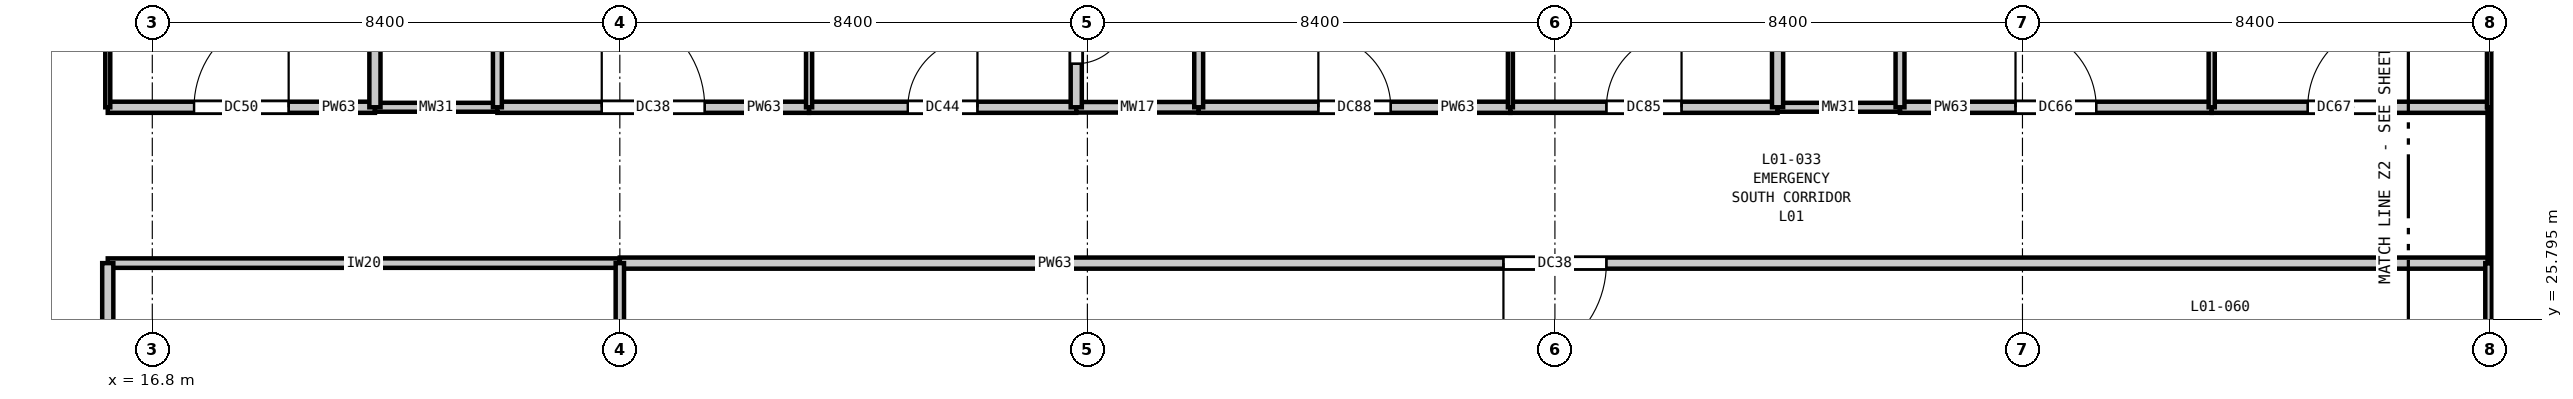
"""IFC4 building model, lengths in metres.
Left out: names, types, materials, properties, quantities, classifications, styles, units other than length and angle.
Written with IfcOpenShell. Run it as: python <this file> out.ifc"""

import sys

from ifc_helpers import new_model, si_unit, direction, frame, frame_2d, origin, place, context, subcontext, project, spatial, rectangle, extrude, element, fill, save


model = new_model("IFC4")
c1 = context("Model", 3, precision=1e-05, world=origin(), true_north=direction((0.0, 1.0)))
c2 = subcontext(c1, "Body", "Model", "MODEL_VIEW")
j1 = project(units=[si_unit("LENGTHUNIT", "METRE"), si_unit("PLANEANGLEUNIT", "RADIAN")], contexts=[c1])
p1 = place(None, origin())
s1 = spatial("IfcSite", under=j1, at=p1, CompositionType="ELEMENT")
p2 = place(p1, origin())
s2 = spatial("IfcBuilding", under=s1, at=p2, CompositionType="ELEMENT")
p3 = place(p2, frame((0.0, 0.0, 5.4)))
s3 = spatial("IfcBuildingStorey", under=s2, at=p3, CompositionType="ELEMENT", Elevation=5.4)
p4 = place(p3, frame((16.0, 26.8, 0.0), z_axis=(0.0, 0.0, 1.0), x_axis=(1.0, 0.0, 0.0)))
e1 = element("IfcWall", 1, at=p4, inside=s3, PredefinedType="PARTITIONING", context=c2, shape_type="SweptSolid", body=[
    extrude(rectangle(XDim=9.2, YDim=0.17, at=frame_2d((4.6, 0.0))), origin(), (0.0, 0.0, 1.0), 5.05),
])
p5 = place(p3, frame((25.2, 26.8, 0.0), z_axis=(0.0, 0.0, 1.0), x_axis=(1.0, 0.0, 0.0)))
e2 = element("IfcWall", 2, at=p5, inside=s3, PredefinedType="PARTITIONING", context=c2, shape_type="SweptSolid", body=[
    extrude(rectangle(XDim=33.6, YDim=0.2, at=frame_2d((16.8, 0.0))), origin(), (0.0, 0.0, 1.0), 5.05),
])
p6 = place(p5, frame((15.875, 0.0, 0.0)))
e3 = element("IfcOpeningElement", 3, at=p6, cuts=e2, PredefinedType="OPENING", context=c2, shape_type="SweptSolid", body=[
    extrude(rectangle(XDim=1.85, YDim=2.3, at=frame_2d((0.925, 1.15))), frame((0.0, 0.11, 0.0), z_axis=(0.0, -1.0, 0.0), x_axis=(1.0, 0.0, 0.0)), (0.0, 0.0, 1.0), 0.22),
])
p7 = place(p3, frame((16.0, 29.6, 0.0), z_axis=(0.0, 0.0, 1.0), x_axis=(1.0, 0.0, 0.0)))
e4 = element("IfcWall", 4, at=p7, inside=s3, PredefinedType="PARTITIONING", context=c2, shape_type="SweptSolid", body=[
    extrude(rectangle(XDim=4.8, YDim=0.2, at=frame_2d((2.4, 0.0))), origin(), (0.0, 0.0, 1.0), 5.05),
])
p8 = place(p7, frame((1.55, 0.0, 0.0)))
e5 = element("IfcOpeningElement", 5, at=p8, cuts=e4, PredefinedType="OPENING", context=c2, shape_type="SweptSolid", body=[
    extrude(rectangle(XDim=1.7, YDim=2.3, at=frame_2d((0.85, 1.15))), frame((0.0, 0.11, 0.0), z_axis=(0.0, -1.0, 0.0), x_axis=(1.0, 0.0, 0.0)), (0.0, 0.0, 1.0), 0.22),
])
p9 = place(p3, frame((20.8, 29.6, 0.0), z_axis=(0.0, 0.0, 1.0), x_axis=(1.0, 0.0, 0.0)))
e6 = element("IfcWall", 6, at=p9, inside=s3, PredefinedType="PLUMBINGWALL", context=c2, shape_type="SweptSolid", body=[
    extrude(rectangle(XDim=2.2, YDim=0.16, at=frame_2d((1.1, 0.0))), origin(), (0.0, 0.0, 1.0), 5.05),
])
p10 = place(p3, frame((23.0, 29.6, 0.0), z_axis=(0.0, 0.0, 1.0), x_axis=(1.0, 0.0, 0.0)))
e7 = element("IfcWall", 7, at=p10, inside=s3, PredefinedType="PARTITIONING", context=c2, shape_type="SweptSolid", body=[
    extrude(rectangle(XDim=5.6, YDim=0.2, at=frame_2d((2.8, 0.0))), origin(), (0.0, 0.0, 1.0), 5.05),
])
p11 = place(p10, frame((1.875, 0.0, 0.0)))
e8 = element("IfcOpeningElement", 8, at=p11, cuts=e7, PredefinedType="OPENING", context=c2, shape_type="SweptSolid", body=[
    extrude(rectangle(XDim=1.85, YDim=2.3, at=frame_2d((0.925, 1.15))), frame((0.0, 0.11, 0.0), z_axis=(0.0, -1.0, 0.0), x_axis=(1.0, 0.0, 0.0)), (0.0, 0.0, 1.0), 0.22),
])
p12 = place(p3, frame((28.6, 29.6, 0.0), z_axis=(0.0, 0.0, 1.0), x_axis=(1.0, 0.0, 0.0)))
e9 = element("IfcWall", 9, at=p12, inside=s3, PredefinedType="PARTITIONING", context=c2, shape_type="SweptSolid", body=[
    extrude(rectangle(XDim=4.8, YDim=0.2, at=frame_2d((2.4, 0.0))), origin(), (0.0, 0.0, 1.0), 5.05),
])
p13 = place(p12, frame((1.775, 0.0, 0.0)))
e10 = element("IfcOpeningElement", 10, at=p13, cuts=e9, PredefinedType="OPENING", context=c2, shape_type="SweptSolid", body=[
    extrude(rectangle(XDim=1.25, YDim=2.15, at=frame_2d((0.625, 1.075))), frame((0.0, 0.11, 0.0), z_axis=(0.0, -1.0, 0.0), x_axis=(1.0, 0.0, 0.0)), (0.0, 0.0, 1.0), 0.22),
])
p14 = place(p3, frame((33.4, 29.6, 0.0), z_axis=(0.0, 0.0, 1.0), x_axis=(1.0, 0.0, 0.0)))
e11 = element("IfcWall", 11, at=p14, inside=s3, PredefinedType="PLUMBINGWALL", context=c2, shape_type="SweptSolid", body=[
    extrude(rectangle(XDim=2.2, YDim=0.19, at=frame_2d((1.1, 0.0))), origin(), (0.0, 0.0, 1.0), 5.05),
])
p15 = place(p3, frame((35.6, 29.6, 0.0), z_axis=(0.0, 0.0, 1.0), x_axis=(1.0, 0.0, 0.0)))
e12 = element("IfcWall", 12, at=p15, inside=s3, PredefinedType="PARTITIONING", context=c2, shape_type="SweptSolid", body=[
    extrude(rectangle(XDim=5.6, YDim=0.2, at=frame_2d((2.8, 0.0))), origin(), (0.0, 0.0, 1.0), 5.05),
])
p16 = place(p15, frame((2.15, 0.0, 0.0)))
e13 = element("IfcOpeningElement", 13, at=p16, cuts=e12, PredefinedType="OPENING", context=c2, shape_type="SweptSolid", body=[
    extrude(rectangle(XDim=1.3, YDim=2.2, at=frame_2d((0.65, 1.1))), frame((0.0, 0.11, 0.0), z_axis=(0.0, -1.0, 0.0), x_axis=(1.0, 0.0, 0.0)), (0.0, 0.0, 1.0), 0.22),
])
p17 = place(p3, frame((41.2, 29.6, 0.0), z_axis=(0.0, 0.0, 1.0), x_axis=(1.0, 0.0, 0.0)))
e14 = element("IfcWall", 14, at=p17, inside=s3, PredefinedType="PARTITIONING", context=c2, shape_type="SweptSolid", body=[
    extrude(rectangle(XDim=4.8, YDim=0.2, at=frame_2d((2.4, 0.0))), origin(), (0.0, 0.0, 1.0), 5.05),
])
p18 = place(p17, frame((1.725, 0.0, 0.0)))
e15 = element("IfcOpeningElement", 15, at=p18, cuts=e14, PredefinedType="OPENING", context=c2, shape_type="SweptSolid", body=[
    extrude(rectangle(XDim=1.35, YDim=2.2, at=frame_2d((0.675, 1.1))), frame((0.0, 0.11, 0.0), z_axis=(0.0, -1.0, 0.0), x_axis=(1.0, 0.0, 0.0)), (0.0, 0.0, 1.0), 0.22),
])
p19 = place(p3, frame((46.0, 29.6, 0.0), z_axis=(0.0, 0.0, 1.0), x_axis=(1.0, 0.0, 0.0)))
e16 = element("IfcWall", 16, at=p19, inside=s3, PredefinedType="PLUMBINGWALL", context=c2, shape_type="SweptSolid", body=[
    extrude(rectangle(XDim=2.2, YDim=0.16, at=frame_2d((1.1, 0.0))), origin(), (0.0, 0.0, 1.0), 5.05),
])
p20 = place(p3, frame((48.2, 29.6, 0.0), z_axis=(0.0, 0.0, 1.0), x_axis=(1.0, 0.0, 0.0)))
e17 = element("IfcWall", 17, at=p20, inside=s3, PredefinedType="PARTITIONING", context=c2, shape_type="SweptSolid", body=[
    extrude(rectangle(XDim=5.6, YDim=0.2, at=frame_2d((2.8, 0.0))), origin(), (0.0, 0.0, 1.0), 5.05),
])
p21 = place(p20, frame((2.075, 0.0, 0.0)))
e18 = element("IfcOpeningElement", 18, at=p21, cuts=e17, PredefinedType="OPENING", context=c2, shape_type="SweptSolid", body=[
    extrude(rectangle(XDim=1.45, YDim=2.25, at=frame_2d((0.725, 1.125))), frame((0.0, 0.11, 0.0), z_axis=(0.0, -1.0, 0.0), x_axis=(1.0, 0.0, 0.0)), (0.0, 0.0, 1.0), 0.22),
])
p22 = place(p3, frame((53.8, 29.6, 0.0), z_axis=(0.0, 0.0, 1.0), x_axis=(1.0, 0.0, 0.0)))
e19 = element("IfcWall", 19, at=p22, inside=s3, PredefinedType="PARTITIONING", context=c2, shape_type="SweptSolid", body=[
    extrude(rectangle(XDim=5.0, YDim=0.2, at=frame_2d((2.5, 0.0))), origin(), (0.0, 0.0, 1.0), 5.05),
])
p23 = place(p22, frame((1.725, 0.0, 0.0)))
e20 = element("IfcOpeningElement", 20, at=p23, cuts=e19, PredefinedType="OPENING", context=c2, shape_type="SweptSolid", body=[
    extrude(rectangle(XDim=1.55, YDim=2.25, at=frame_2d((0.775, 1.125))), frame((0.0, 0.11, 0.0), z_axis=(0.0, -1.0, 0.0), x_axis=(1.0, 0.0, 0.0)), (0.0, 0.0, 1.0), 0.22),
])
p24 = place(p3, frame((16.0, 0.26, 0.0), z_axis=(0.0, 0.0, 1.0), x_axis=(0.0, 1.0, 0.0)))
e21 = element("IfcWall", 21, at=p24, inside=s3, PredefinedType="PARTITIONING", context=c2, shape_type="SweptSolid", body=[
    extrude(rectangle(XDim=26.54, YDim=0.2, at=frame_2d((13.27, 0.0))), origin(), (0.0, 0.0, 1.0), 5.05),
])
p25 = place(p24, frame((12.545, 0.0, 0.0)))
e22 = element("IfcOpeningElement", 22, at=p25, cuts=e21, PredefinedType="OPENING", context=c2, shape_type="SweptSolid", body=[
    extrude(rectangle(XDim=1.45, YDim=2.25, at=frame_2d((0.725, 1.125))), frame((0.0, 0.11, 0.0), z_axis=(0.0, -1.0, 0.0), x_axis=(1.0, 0.0, 0.0)), (0.0, 0.0, 1.0), 0.22),
])
p26 = place(p3, frame((16.0, 29.6, 0.0), z_axis=(0.0, 0.0, 1.0), x_axis=(0.0, 1.0, 0.0)))
e23 = element("IfcWall", 23, at=p26, inside=s3, PredefinedType="PARTITIONING", context=c2, shape_type="SweptSolid", body=[
    extrude(rectangle(XDim=11.2, YDim=0.09, at=frame_2d((5.6, 0.0))), origin(), (0.0, 0.0, 1.0), 5.05),
])
p27 = place(p3, frame((20.8, 29.6, 0.0), z_axis=(0.0, 0.0, 1.0), x_axis=(0.0, 1.0, 0.0)))
e24 = element("IfcWall", 24, at=p27, inside=s3, PredefinedType="PARTITIONING", context=c2, shape_type="SweptSolid", body=[
    extrude(rectangle(XDim=5.6, YDim=0.2, at=frame_2d((2.8, 0.0))), origin(), (0.0, 0.0, 1.0), 5.05),
])
p28 = place(p27, frame((2.34, 0.0, 0.0)))
e25 = element("IfcOpeningElement", 25, at=p28, cuts=e24, PredefinedType="OPENING", context=c2, shape_type="SweptSolid", body=[
    extrude(rectangle(XDim=0.92, YDim=2.1, at=frame_2d((0.46, 1.05))), frame((0.0, 0.11, 0.0), z_axis=(0.0, -1.0, 0.0), x_axis=(1.0, 0.0, 0.0)), (0.0, 0.0, 1.0), 0.22),
])
p29 = place(p3, frame((23.0, 29.6, 0.0), z_axis=(0.0, 0.0, 1.0), x_axis=(0.0, 1.0, 0.0)))
e26 = element("IfcWall", 26, at=p29, inside=s3, PredefinedType="PLUMBINGWALL", context=c2, shape_type="SweptSolid", body=[
    extrude(rectangle(XDim=5.6, YDim=0.16, at=frame_2d((2.8, 0.0))), origin(), (0.0, 0.0, 1.0), 5.05),
])
p30 = place(p3, frame((25.2, 24.315, 0.0), z_axis=(0.0, 0.0, 1.0), x_axis=(0.0, 1.0, 0.0)))
e27 = element("IfcWall", 27, at=p30, inside=s3, PredefinedType="PARTITIONING", context=c2, shape_type="SweptSolid", body=[
    extrude(rectangle(XDim=2.485, YDim=0.15, at=frame_2d((1.243, 0.0))), origin(), (0.0, 0.0, 1.0), 4.735),
])
p31 = place(p3, frame((28.6, 29.6, 0.0), z_axis=(0.0, 0.0, 1.0), x_axis=(0.0, 1.0, 0.0)))
e28 = element("IfcWall", 28, at=p31, inside=s3, PredefinedType="PARTITIONING", context=c2, shape_type="SweptSolid", body=[
    extrude(rectangle(XDim=10.94, YDim=0.11, at=frame_2d((5.47, 0.0))), origin(), (0.0, 0.0, 1.0), 5.05),
])
p32 = place(p3, frame((33.4, 29.6, 0.0), z_axis=(0.0, 0.0, 1.0), x_axis=(0.0, 1.0, 0.0)))
e29 = element("IfcWall", 29, at=p32, inside=s3, PredefinedType="PARTITIONING", context=c2, shape_type="SweptSolid", body=[
    extrude(rectangle(XDim=2.485, YDim=0.2, at=frame_2d((1.242, 0.0))), origin(), (0.0, 0.0, 1.0), 4.735),
])
p33 = place(p32, frame((0.782, 0.0, 0.0)))
e30 = element("IfcOpeningElement", 30, at=p33, cuts=e29, PredefinedType="OPENING", context=c2, shape_type="SweptSolid", body=[
    extrude(rectangle(XDim=0.92, YDim=2.1, at=frame_2d((0.46, 1.05))), frame((0.0, 0.11, 0.0), z_axis=(0.0, -1.0, 0.0), x_axis=(1.0, 0.0, 0.0)), (0.0, 0.0, 1.0), 0.22),
])
p34 = place(p3, frame((35.6, 29.6, 0.0), z_axis=(0.0, 0.0, 1.0), x_axis=(0.0, 1.0, 0.0)))
e31 = element("IfcWall", 31, at=p34, inside=s3, PredefinedType="PLUMBINGWALL", context=c2, shape_type="SweptSolid", body=[
    extrude(rectangle(XDim=5.6, YDim=0.16, at=frame_2d((2.8, 0.0))), origin(), (0.0, 0.0, 1.0), 5.05),
])
p35 = place(p3, frame((41.2, 29.6, 0.0), z_axis=(0.0, 0.0, 1.0), x_axis=(0.0, 1.0, 0.0)))
e32 = element("IfcWall", 32, at=p35, inside=s3, PredefinedType="PARTITIONING", context=c2, shape_type="SweptSolid", body=[
    extrude(rectangle(XDim=10.94, YDim=0.09, at=frame_2d((5.47, 0.0))), origin(), (0.0, 0.0, 1.0), 5.05),
])
p36 = place(p3, frame((46.0, 29.6, 0.0), z_axis=(0.0, 0.0, 1.0), x_axis=(0.0, 1.0, 0.0)))
e33 = element("IfcWall", 33, at=p36, inside=s3, PredefinedType="PARTITIONING", context=c2, shape_type="SweptSolid", body=[
    extrude(rectangle(XDim=5.6, YDim=0.2, at=frame_2d((2.8, 0.0))), origin(), (0.0, 0.0, 1.0), 5.05),
])
p37 = place(p36, frame((2.34, 0.0, 0.0)))
e34 = element("IfcOpeningElement", 34, at=p37, cuts=e33, PredefinedType="OPENING", context=c2, shape_type="SweptSolid", body=[
    extrude(rectangle(XDim=0.92, YDim=2.1, at=frame_2d((0.46, 1.05))), frame((0.0, 0.11, 0.0), z_axis=(0.0, -1.0, 0.0), x_axis=(1.0, 0.0, 0.0)), (0.0, 0.0, 1.0), 0.22),
])
p38 = place(p3, frame((48.2, 29.6, 0.0), z_axis=(0.0, 0.0, 1.0), x_axis=(0.0, 1.0, 0.0)))
e35 = element("IfcWall", 35, at=p38, inside=s3, PredefinedType="PLUMBINGWALL", context=c2, shape_type="SweptSolid", body=[
    extrude(rectangle(XDim=5.6, YDim=0.16, at=frame_2d((2.8, 0.0))), origin(), (0.0, 0.0, 1.0), 5.05),
])
p39 = place(p3, frame((53.8, 29.6, 0.0), z_axis=(0.0, 0.0, 1.0), x_axis=(0.0, 1.0, 0.0)))
e36 = element("IfcWall", 36, at=p39, inside=s3, PredefinedType="PARTITIONING", context=c2, shape_type="SweptSolid", body=[
    extrude(rectangle(XDim=10.94, YDim=0.11, at=frame_2d((5.47, 0.0))), origin(), (0.0, 0.0, 1.0), 5.05),
])
p40 = place(p3, frame((58.8, 25.0, 0.0), z_axis=(0.0, 0.0, 1.0), x_axis=(0.0, 1.0, 0.0)))
e37 = element("IfcWall", 37, at=p40, inside=s3, PredefinedType="PARTITIONING", context=c2, shape_type="SweptSolid", body=[
    extrude(rectangle(XDim=1.8, YDim=0.17, at=frame_2d((0.9, 0.0))), origin(), (0.0, 0.0, 1.0), 4.735),
])
p41 = place(p3, frame((58.8, 26.8, 0.0), z_axis=(0.0, 0.0, 1.0), x_axis=(0.0, 1.0, 0.0)))
e38 = element("IfcWall", 38, at=p41, inside=s3, PredefinedType="PARTITIONING", context=c2, shape_type="SweptSolid", body=[
    extrude(rectangle(XDim=2.8, YDim=0.09, at=frame_2d((1.4, 0.0))), origin(), (0.0, 0.0, 1.0), 4.735),
])
p42 = place(p3, frame((58.8, 29.6, 0.0), z_axis=(0.0, 0.0, 1.0), x_axis=(0.0, 1.0, 0.0)))
e39 = element("IfcWall", 39, at=p42, inside=s3, PredefinedType="PARTITIONING", context=c2, shape_type="SweptSolid", body=[
    extrude(rectangle(XDim=2.56, YDim=0.11, at=frame_2d((1.28, 0.0))), origin(), (0.0, 0.0, 1.0), 4.735),
])
p43 = place(p6, frame((1.85, 0.0, 0.0), z_axis=(0.0, 0.0, 1.0), x_axis=(-1.0, 0.0, 0.0)))
e40 = element("IfcDoor", 40, at=p43, inside=s3, OperationType="SINGLE_SWING_RIGHT", PredefinedType="DOOR", context=c2, shape_type="SweptSolid", body=[
    extrude(rectangle(XDim=1.85, YDim=2.3, at=frame_2d((0.925, 1.15))), frame((0.0, 0.025, 0.0), z_axis=(0.0, -1.0, 0.0), x_axis=(1.0, 0.0, 0.0)), (0.0, 0.0, 1.0), 0.05),
])
fill(e3, e40)
p44 = place(p8, origin())
e41 = element("IfcDoor", 41, at=p44, inside=s3, OperationType="SINGLE_SWING_RIGHT", PredefinedType="DOOR", context=c2, shape_type="SweptSolid", body=[
    extrude(rectangle(XDim=1.7, YDim=2.3, at=frame_2d((0.85, 1.15))), frame((0.0, 0.025, 0.0), z_axis=(0.0, -1.0, 0.0), x_axis=(1.0, 0.0, 0.0)), (0.0, 0.0, 1.0), 0.05),
])
fill(e5, e41)
p45 = place(p11, origin())
e42 = element("IfcDoor", 42, at=p45, inside=s3, OperationType="SINGLE_SWING_LEFT", PredefinedType="DOOR", context=c2, shape_type="SweptSolid", body=[
    extrude(rectangle(XDim=1.85, YDim=2.3, at=frame_2d((0.925, 1.15))), frame((0.0, 0.025, 0.0), z_axis=(0.0, -1.0, 0.0), x_axis=(1.0, 0.0, 0.0)), (0.0, 0.0, 1.0), 0.05),
])
fill(e8, e42)
p46 = place(p13, origin())
e43 = element("IfcDoor", 43, at=p46, inside=s3, OperationType="SINGLE_SWING_RIGHT", PredefinedType="DOOR", context=c2, shape_type="SweptSolid", body=[
    extrude(rectangle(XDim=1.25, YDim=2.15, at=frame_2d((0.625, 1.075))), frame((0.0, 0.025, 0.0), z_axis=(0.0, -1.0, 0.0), x_axis=(1.0, 0.0, 0.0)), (0.0, 0.0, 1.0), 0.05),
])
fill(e10, e43)
p47 = place(p16, origin())
e44 = element("IfcDoor", 44, at=p47, inside=s3, OperationType="SINGLE_SWING_LEFT", PredefinedType="DOOR", context=c2, shape_type="SweptSolid", body=[
    extrude(rectangle(XDim=1.3, YDim=2.2, at=frame_2d((0.65, 1.1))), frame((0.0, 0.025, 0.0), z_axis=(0.0, -1.0, 0.0), x_axis=(1.0, 0.0, 0.0)), (0.0, 0.0, 1.0), 0.05),
])
fill(e13, e44)
p48 = place(p18, origin())
e45 = element("IfcDoor", 45, at=p48, inside=s3, OperationType="SINGLE_SWING_RIGHT", PredefinedType="DOOR", context=c2, shape_type="SweptSolid", body=[
    extrude(rectangle(XDim=1.35, YDim=2.2, at=frame_2d((0.675, 1.1))), frame((0.0, 0.025, 0.0), z_axis=(0.0, -1.0, 0.0), x_axis=(1.0, 0.0, 0.0)), (0.0, 0.0, 1.0), 0.05),
])
fill(e15, e45)
p49 = place(p21, origin())
e46 = element("IfcDoor", 46, at=p49, inside=s3, OperationType="SINGLE_SWING_LEFT", PredefinedType="DOOR", context=c2, shape_type="SweptSolid", body=[
    extrude(rectangle(XDim=1.45, YDim=2.25, at=frame_2d((0.725, 1.125))), frame((0.0, 0.025, 0.0), z_axis=(0.0, -1.0, 0.0), x_axis=(1.0, 0.0, 0.0)), (0.0, 0.0, 1.0), 0.05),
])
fill(e18, e46)
p50 = place(p23, origin())
e47 = element("IfcDoor", 47, at=p50, inside=s3, OperationType="SINGLE_SWING_RIGHT", PredefinedType="DOOR", context=c2, shape_type="SweptSolid", body=[
    extrude(rectangle(XDim=1.55, YDim=2.25, at=frame_2d((0.775, 1.125))), frame((0.0, 0.025, 0.0), z_axis=(0.0, -1.0, 0.0), x_axis=(1.0, 0.0, 0.0)), (0.0, 0.0, 1.0), 0.05),
])
fill(e20, e47)
p51 = place(p33, frame((0.92, 0.0, 0.0), z_axis=(0.0, 0.0, 1.0), x_axis=(-1.0, 0.0, 0.0)))
e48 = element("IfcDoor", 48, at=p51, inside=s3, OperationType="SINGLE_SWING_LEFT", PredefinedType="DOOR", context=c2, shape_type="SweptSolid", body=[
    extrude(rectangle(XDim=0.92, YDim=2.1, at=frame_2d((0.46, 1.05))), frame((0.0, 0.025, 0.0), z_axis=(0.0, -1.0, 0.0), x_axis=(1.0, 0.0, 0.0)), (0.0, 0.0, 1.0), 0.05),
])
fill(e30, e48)
save(model, sys.argv[1])
